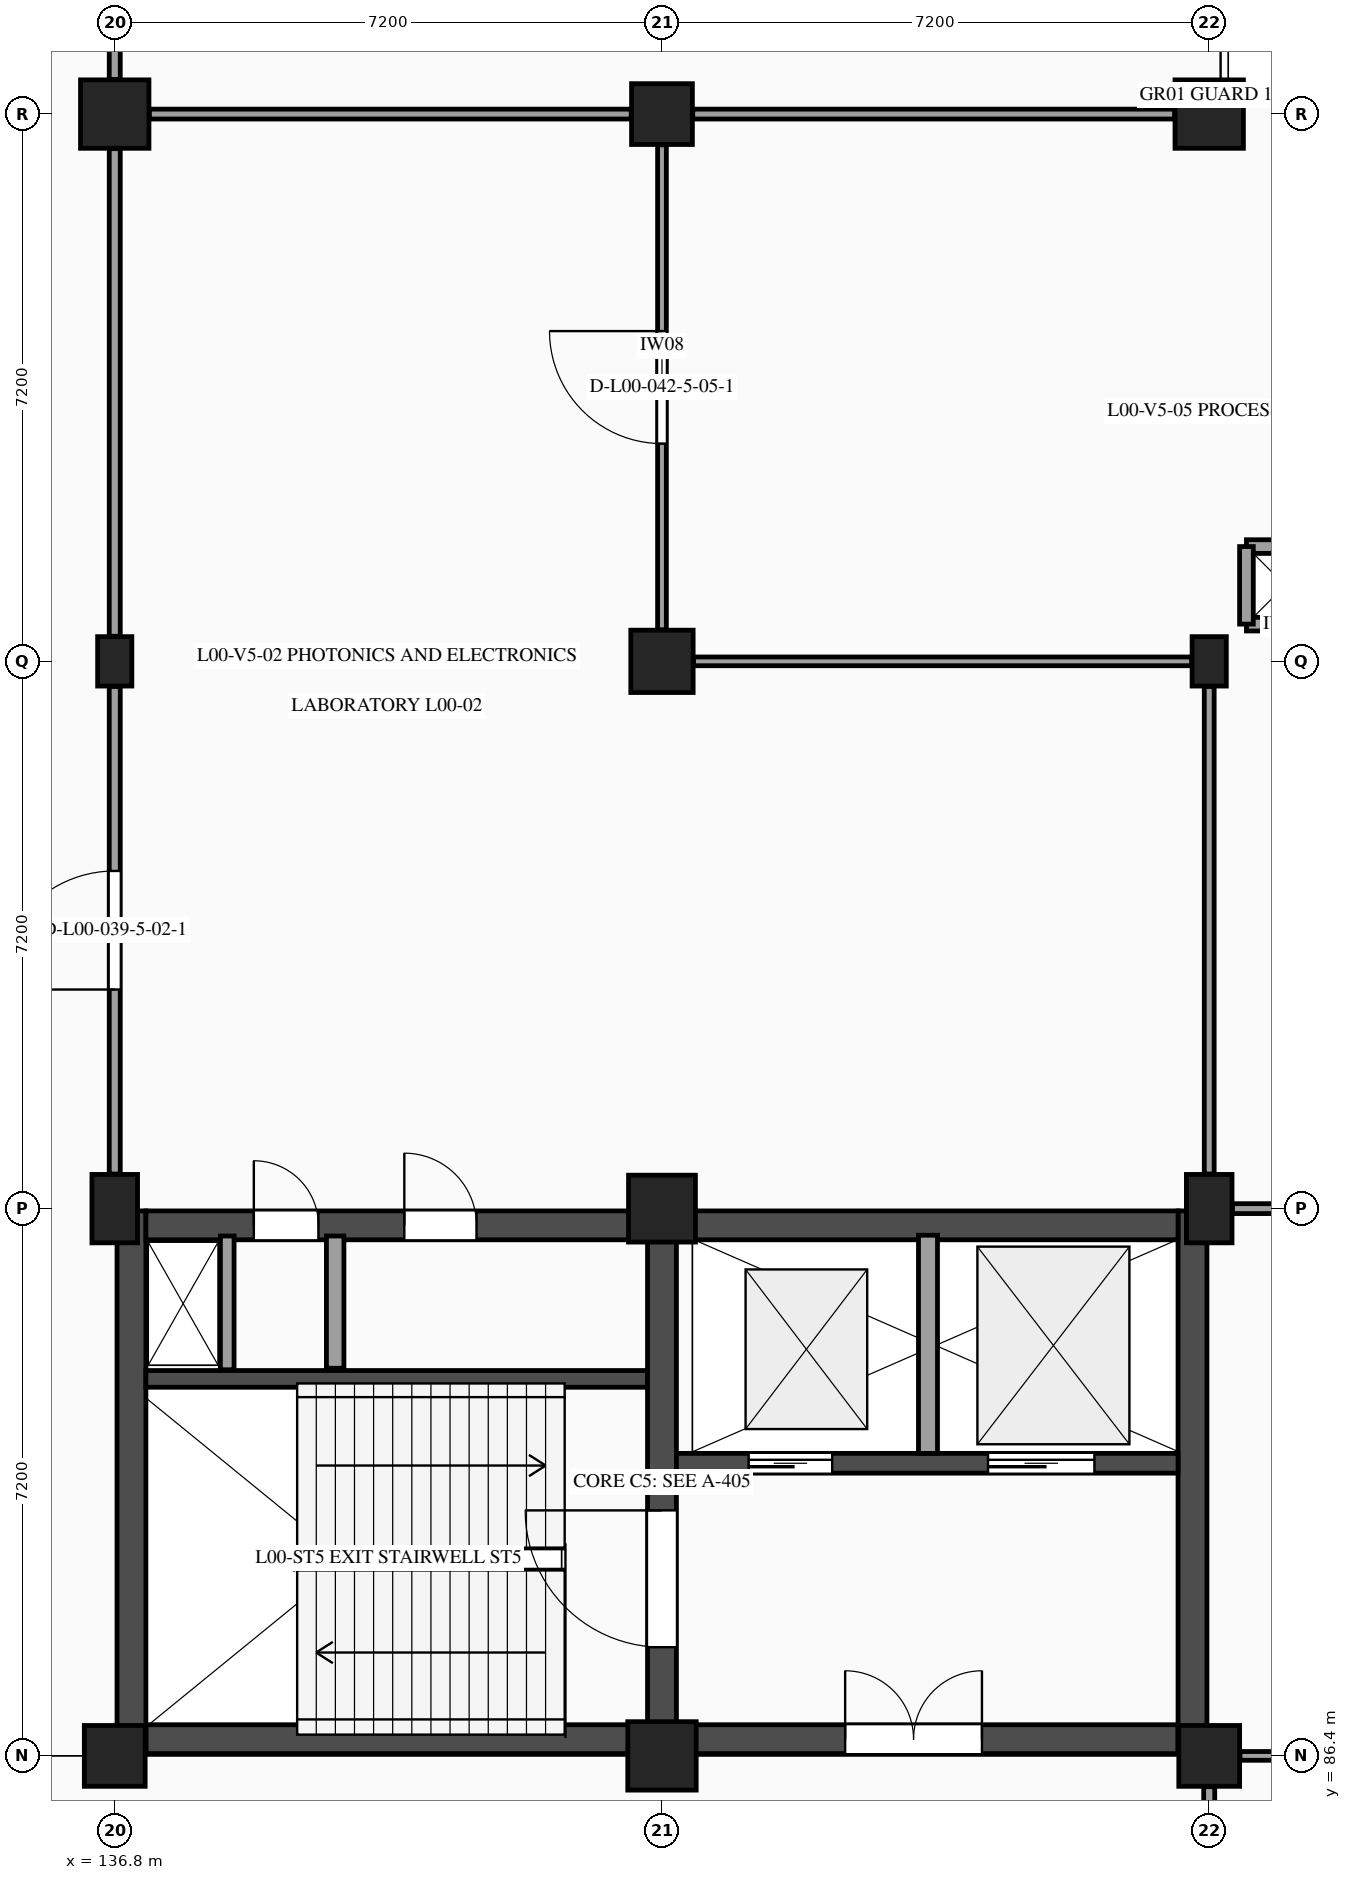
"""IFC4 building model, lengths in metres.
Left out: names, types, materials, properties, quantities, classifications, styles, units other than length and angle.
Written with IfcOpenShell. Run it as: python <this file> out.ifc"""

import sys

from ifc_helpers import new_model, si_unit, direction, frame, frame_2d, origin, origin_2d, place, context, subcontext, project, spatial, rectangle, extrude, element, fill, save


model = new_model("IFC4")
c1 = context("Model", 3, precision=1e-05, world=origin(), true_north=direction((0.0, 1.0)))
c2 = subcontext(c1, "Body", "Model", "MODEL_VIEW")
j1 = project(units=[si_unit("LENGTHUNIT", "METRE"), si_unit("PLANEANGLEUNIT", "RADIAN")], contexts=[c1])
p1 = place(None, origin())
s1 = spatial("IfcSite", under=j1, at=p1, CompositionType="ELEMENT")
p2 = place(p1, origin())
s2 = spatial("IfcBuilding", under=s1, at=p2, CompositionType="ELEMENT")
p3 = place(p2, origin())
s3 = spatial("IfcBuildingStorey", under=s2, at=p3, CompositionType="ELEMENT", Elevation=0.0)
p4 = place(p3, frame((136.8, 86.4, 0.0), z_axis=(0.0, 0.0, 1.0), x_axis=(1.0, 0.0, 0.0)))
e1 = element("IfcColumn", 1, at=p4, inside=s3, PredefinedType="COLUMN", context=c2, shape_type="SweptSolid", body=[
    extrude(rectangle(XDim=0.8, YDim=0.8, at=origin_2d()), origin(), (0.0, 0.0, 1.0), 5.4),
])
p5 = place(p3, frame((136.8, 93.6, 0.0), z_axis=(0.0, 0.0, 1.0), x_axis=(1.0, 0.0, 0.0)))
e2 = element("IfcColumn", 2, at=p5, inside=s3, PredefinedType="COLUMN", context=c2, shape_type="SweptSolid", body=[
    extrude(rectangle(XDim=0.6, YDim=0.9, at=origin_2d()), origin(), (0.0, 0.0, 1.0), 5.4),
])
p6 = place(p3, frame((136.8, 100.8, 0.0), z_axis=(0.0, 0.0, 1.0), x_axis=(1.0, 0.0, 0.0)))
e3 = element("IfcColumn", 3, at=p6, inside=s3, PredefinedType="PILASTER", context=c2, shape_type="SweptSolid", body=[
    extrude(rectangle(XDim=0.45, YDim=0.65, at=origin_2d()), origin(), (0.0, 0.0, 1.0), 5.4),
])
for number, where, z_axis, x_axis in (
    (4, (136.8, 108.0, 0.0), (0.0, 0.0, 1.0), (1.0, 0.0, 0.0)),
    (5, (144.0, 86.4, 0.0), (0.0, 0.0, 1.0), (1.0, 0.0, 0.0)),
):
    element("IfcColumn", number, at=place(p3, frame(where, z_axis=z_axis, x_axis=x_axis)), inside=s3, PredefinedType="COLUMN", context=c2, shape_type="SweptSolid", body=[
        extrude(rectangle(XDim=0.9, YDim=0.9, at=origin_2d()), origin(), (0.0, 0.0, 1.0), 5.4),
    ])
p7 = place(p3, frame((144.0, 93.6, 0.0), z_axis=(0.0, 0.0, 1.0), x_axis=(1.0, 0.0, 0.0)))
e6 = element("IfcColumn", 6, at=p7, inside=s3, PredefinedType="COLUMN", context=c2, shape_type="SweptSolid", body=[
    extrude(rectangle(XDim=0.88, YDim=0.88, at=origin_2d()), origin(), (0.0, 0.0, 1.0), 5.4),
])
p8 = place(p3, frame((144.0, 100.8, 0.0), z_axis=(0.0, 0.0, 1.0), x_axis=(1.0, 0.0, 0.0)))
e7 = element("IfcColumn", 7, at=p8, inside=s3, PredefinedType="COLUMN", context=c2, shape_type="SweptSolid", body=[
    extrude(rectangle(XDim=0.82, YDim=0.82, at=origin_2d()), origin(), (0.0, 0.0, 1.0), 5.4),
])
for number, where, z_axis, x_axis in (
    (8, (144.0, 108.0, 0.0), (0.0, 0.0, 1.0), (1.0, 0.0, 0.0)),
    (9, (151.2, 86.4, 0.0), (0.0, 0.0, 1.0), (1.0, 0.0, 0.0)),
):
    element("IfcColumn", number, at=place(p3, frame(where, z_axis=z_axis, x_axis=x_axis)), inside=s3, PredefinedType="COLUMN", context=c2, shape_type="SweptSolid", body=[
        extrude(rectangle(XDim=0.8, YDim=0.8, at=origin_2d()), origin(), (0.0, 0.0, 1.0), 5.4),
    ])
p9 = place(p3, frame((151.2, 93.6, 0.0), z_axis=(0.0, 0.0, 1.0), x_axis=(1.0, 0.0, 0.0)))
e10 = element("IfcColumn", 10, at=p9, inside=s3, PredefinedType="COLUMN", context=c2, shape_type="SweptSolid", body=[
    extrude(rectangle(XDim=0.6, YDim=0.9, at=origin_2d()), origin(), (0.0, 0.0, 1.0), 5.4),
])
p10 = place(p3, frame((151.2, 100.8, 0.0), z_axis=(0.0, 0.0, 1.0), x_axis=(1.0, 0.0, 0.0)))
e11 = element("IfcColumn", 11, at=p10, inside=s3, PredefinedType="PILASTER", context=c2, shape_type="SweptSolid", body=[
    extrude(rectangle(XDim=0.45, YDim=0.65, at=origin_2d()), origin(), (0.0, 0.0, 1.0), 5.4),
])
p11 = place(p3, frame((151.2, 108.0, 0.0), z_axis=(0.0, 0.0, 1.0), x_axis=(1.0, 0.0, 0.0)))
e12 = element("IfcColumn", 12, at=p11, inside=s3, PredefinedType="COLUMN", context=c2, shape_type="SweptSolid", body=[
    extrude(rectangle(XDim=0.9, YDim=0.9, at=origin_2d()), origin(), (0.0, 0.0, 1.0), 5.4),
])
p12 = place(p3, frame((137.21, 86.62, 0.0), z_axis=(0.0, 0.0, 1.0), x_axis=(1.0, 0.0, 0.0)))
e13 = element("IfcWall", 13, at=p12, inside=s3, PredefinedType="SHEAR", context=c2, shape_type="SweptSolid", body=[
    extrude(rectangle(XDim=6.6, YDim=0.38, at=frame_2d((3.3, 0.0))), origin(), (0.0, 0.0, 1.0), 5.09),
])
p13 = place(p3, frame((137.02, 93.57, 0.0), z_axis=(0.0, 0.0, 1.0), x_axis=(0.0, -1.0, 0.0)))
e14 = element("IfcWall", 14, at=p13, inside=s3, PredefinedType="SHEAR", context=c2, shape_type="SweptSolid", body=[
    extrude(rectangle(XDim=7.14, YDim=0.38, at=frame_2d((3.57, 0.0))), origin(), (0.0, 0.0, 1.0), 5.09),
])
p14 = place(p3, frame((137.21, 93.38, 0.0), z_axis=(0.0, 0.0, 1.0), x_axis=(1.0, 0.0, 0.0)))
e15 = element("IfcWall", 15, at=p14, inside=s3, PredefinedType="SHEAR", context=c2, shape_type="SweptSolid", body=[
    extrude(rectangle(XDim=6.6, YDim=0.38, at=frame_2d((3.3, 0.0))), origin(), (0.0, 0.0, 1.0), 5.09),
])
p15 = place(p14, frame((1.42, 0.0, 0.0)))
e16 = element("IfcOpeningElement", 16, at=p15, cuts=e15, PredefinedType="OPENING", context=c2, shape_type="SweptSolid", body=[
    extrude(rectangle(XDim=0.85, YDim=2.1, at=frame_2d((0.425, 1.05))), frame((0.0, 0.2, 0.0), z_axis=(0.0, -1.0, 0.0), x_axis=(1.0, 0.0, 0.0)), (0.0, 0.0, 1.0), 0.4),
])
p16 = place(p14, frame((3.4, 0.0, 0.0)))
e17 = element("IfcOpeningElement", 17, at=p16, cuts=e15, PredefinedType="OPENING", context=c2, shape_type="SweptSolid", body=[
    extrude(rectangle(XDim=0.95, YDim=2.15, at=frame_2d((0.475, 1.075))), frame((0.0, 0.2, 0.0), z_axis=(0.0, -1.0, 0.0), x_axis=(1.0, 0.0, 0.0)), (0.0, 0.0, 1.0), 0.4),
])
p17 = place(p3, frame((137.21, 91.36, 0.0), z_axis=(0.0, 0.0, 1.0), x_axis=(1.0, 0.0, 0.0)))
e18 = element("IfcWall", 18, at=p17, inside=s3, PredefinedType="SHEAR", context=c2, shape_type="SweptSolid", body=[
    extrude(rectangle(XDim=6.6, YDim=0.22, at=frame_2d((3.3, 0.0))), origin(), (0.0, 0.0, 1.0), 5.09),
])
p18 = place(p3, frame((139.7, 91.5, 0.0), z_axis=(0.0, 0.0, 1.0), x_axis=(0.0, 1.0, 0.0)))
e19 = element("IfcWall", 19, at=p18, inside=s3, PredefinedType="PARTITIONING", context=c2, shape_type="SweptSolid", body=[
    extrude(rectangle(XDim=1.74, YDim=0.23, at=frame_2d((0.87, 0.0))), origin(), (0.0, 0.0, 1.0), 5.09),
])
p19 = place(p3, frame((138.28, 91.48, 0.0), z_axis=(0.0, 0.0, 1.0), x_axis=(0.0, 1.0, 0.0)))
e20 = element("IfcWall", 20, at=p19, inside=s3, PredefinedType="PARTITIONING", context=c2, shape_type="SweptSolid", body=[
    extrude(rectangle(XDim=1.76, YDim=0.18, at=frame_2d((0.88, 0.0))), origin(), (0.0, 0.0, 1.0), 5.09),
])
p20 = place(p3, frame((144.0, 86.43, 0.0), z_axis=(0.0, 0.0, 1.0), x_axis=(0.0, 1.0, 0.0)))
e21 = element("IfcWall", 21, at=p20, inside=s3, PredefinedType="SHEAR", context=c2, shape_type="SweptSolid", body=[
    extrude(rectangle(XDim=7.14, YDim=0.38, at=frame_2d((3.57, 0.0))), origin(), (0.0, 0.0, 1.0), 5.09),
])
p21 = place(p20, frame((1.4, 0.0, 0.0)))
e22 = element("IfcOpeningElement", 22, at=p21, cuts=e21, PredefinedType="OPENING", context=c2, shape_type="SweptSolid", body=[
    extrude(rectangle(XDim=1.8, YDim=2.2, at=frame_2d((0.9, 1.1))), frame((0.0, 0.2, 0.0), z_axis=(0.0, -1.0, 0.0), x_axis=(1.0, 0.0, 0.0)), (0.0, 0.0, 1.0), 0.4),
])
p22 = place(p3, frame((144.19, 86.62, 0.0), z_axis=(0.0, 0.0, 1.0), x_axis=(1.0, 0.0, 0.0)))
e23 = element("IfcWall", 23, at=p22, inside=s3, PredefinedType="SHEAR", context=c2, shape_type="SweptSolid", body=[
    extrude(rectangle(XDim=6.6, YDim=0.38, at=frame_2d((3.3, 0.0))), origin(), (0.0, 0.0, 1.0), 5.09),
])
p23 = place(p22, frame((2.22, 0.0, 0.0)))
e24 = element("IfcOpeningElement", 24, at=p23, cuts=e23, PredefinedType="OPENING", context=c2, shape_type="SweptSolid", body=[
    extrude(rectangle(XDim=1.8, YDim=2.2, at=frame_2d((0.9, 1.1))), frame((0.0, 0.2, 0.0), z_axis=(0.0, -1.0, 0.0), x_axis=(1.0, 0.0, 0.0)), (0.0, 0.0, 1.0), 0.4),
])
p24 = place(p3, frame((150.98, 86.43, 0.0), z_axis=(0.0, 0.0, 1.0), x_axis=(0.0, 1.0, 0.0)))
e25 = element("IfcWall", 25, at=p24, inside=s3, PredefinedType="SHEAR", context=c2, shape_type="SweptSolid", body=[
    extrude(rectangle(XDim=7.14, YDim=0.38, at=frame_2d((3.57, 0.0))), origin(), (0.0, 0.0, 1.0), 5.09),
])
p25 = place(p3, frame((144.19, 93.38, 0.0), z_axis=(0.0, 0.0, 1.0), x_axis=(1.0, 0.0, 0.0)))
e26 = element("IfcWall", 26, at=p25, inside=s3, PredefinedType="SHEAR", context=c2, shape_type="SweptSolid", body=[
    extrude(rectangle(XDim=6.6, YDim=0.38, at=frame_2d((3.3, 0.0))), origin(), (0.0, 0.0, 1.0), 5.09),
])
p26 = place(p3, frame((144.19, 90.25, 0.0), z_axis=(0.0, 0.0, 1.0), x_axis=(1.0, 0.0, 0.0)))
e27 = element("IfcWall", 27, at=p26, inside=s3, PredefinedType="SHEAR", context=c2, shape_type="SweptSolid", body=[
    extrude(rectangle(XDim=6.6, YDim=0.26, at=frame_2d((3.3, 0.0))), origin(), (0.0, 0.0, 1.0), 5.09),
])
p27 = place(p26, frame((0.95, 0.0, 0.0)))
e28 = element("IfcOpeningElement", 28, at=p27, cuts=e27, PredefinedType="OPENING", context=c2, shape_type="SweptSolid", body=[
    extrude(rectangle(XDim=1.1, YDim=2.2, at=frame_2d((0.55, 1.1))), frame((0.0, 0.14, 0.0), z_axis=(0.0, -1.0, 0.0), x_axis=(1.0, 0.0, 0.0)), (0.0, 0.0, 1.0), 0.28),
])
p28 = place(p26, frame((4.1, 0.0, 0.0)))
e29 = element("IfcOpeningElement", 29, at=p28, cuts=e27, PredefinedType="OPENING", context=c2, shape_type="SweptSolid", body=[
    extrude(rectangle(XDim=1.4, YDim=2.3, at=frame_2d((0.7, 1.15))), frame((0.0, 0.14, 0.0), z_axis=(0.0, -1.0, 0.0), x_axis=(1.0, 0.0, 0.0)), (0.0, 0.0, 1.0), 0.28),
])
p29 = place(p3, frame((147.5, 90.38, 0.0), z_axis=(0.0, 0.0, 1.0), x_axis=(0.0, 1.0, 0.0)))
e30 = element("IfcWall", 30, at=p29, inside=s3, PredefinedType="PARTITIONING", context=c2, shape_type="SweptSolid", body=[
    extrude(rectangle(XDim=2.87, YDim=0.25, at=frame_2d((1.435, 0.0))), origin(), (0.0, 0.0, 1.0), 5.09),
])
for number, where, z_axis, x_axis in (
    (31, (151.69, 101.29, 0.0), (0.0, 0.0, 1.0), (1.0, 0.0, 0.0)),
    (32, (152.71, 102.31, 0.0), (0.0, 0.0, 1.0), (-1.0, 0.0, 0.0)),
    (33, (151.69, 102.31, 0.0), (0.0, 0.0, 1.0), (0.0, -1.0, 0.0)),
):
    element("IfcWall", number, at=place(p3, frame(where, z_axis=z_axis, x_axis=x_axis)), inside=s3, PredefinedType="PARTITIONING", context=c2, shape_type="SweptSolid", body=[
        extrude(rectangle(XDim=1.02, YDim=0.18, at=frame_2d((0.51, 0.0))), origin(), (0.0, 0.0, 1.0), 5.09),
    ])
p30 = place(p3, frame((136.8, 94.055, 0.0), z_axis=(0.0, 0.0, 1.0), x_axis=(0.0, 1.0, 0.0)))
e34 = element("IfcWall", 34, at=p30, inside=s3, PredefinedType="PARTITIONING", context=c2, shape_type="SweptSolid", body=[
    extrude(rectangle(XDim=6.415, YDim=0.145, at=frame_2d((3.208, 0.0))), origin(), (0.0, 0.0, 1.0), 4.46),
])
p31 = place(p30, frame((2.427, 0.0, 0.0)))
e35 = element("IfcOpeningElement", 35, at=p31, cuts=e34, PredefinedType="OPENING", context=c2, shape_type="SweptSolid", body=[
    extrude(rectangle(XDim=1.56, YDim=2.25, at=frame_2d((0.78, 1.125))), frame((0.0, 0.083, 0.0), z_axis=(0.0, -1.0, 0.0), x_axis=(1.0, 0.0, 0.0)), (0.0, 0.0, 1.0), 0.165),
])
p32 = place(p3, frame((136.8, 101.13, 0.0), z_axis=(0.0, 0.0, 1.0), x_axis=(0.0, 1.0, 0.0)))
e36 = element("IfcWall", 36, at=p32, inside=s3, PredefinedType="PARTITIONING", context=c2, shape_type="SweptSolid", body=[
    extrude(rectangle(XDim=6.415, YDim=0.145, at=frame_2d((3.208, 0.0))), origin(), (0.0, 0.0, 1.0), 4.455),
])
p33 = place(p3, frame((136.8, 108.455, 0.0), z_axis=(0.0, 0.0, 1.0), x_axis=(0.0, 1.0, 0.0)))
e37 = element("IfcWall", 37, at=p33, inside=s3, PredefinedType="PARTITIONING", context=c2, shape_type="SweptSolid", body=[
    extrude(rectangle(XDim=6.3, YDim=0.145, at=frame_2d((3.15, 0.0))), origin(), (0.0, 0.0, 1.0), 4.405),
])
p34 = place(p33, frame((2.46, 0.0, 0.0)))
e38 = element("IfcOpeningElement", 38, at=p34, cuts=e37, PredefinedType="OPENING", context=c2, shape_type="SweptSolid", body=[
    extrude(rectangle(XDim=1.38, YDim=2.22, at=frame_2d((0.69, 1.11))), frame((0.0, 0.083, 0.0), z_axis=(0.0, -1.0, 0.0), x_axis=(1.0, 0.0, 0.0)), (0.0, 0.0, 1.0), 0.165),
])
p35 = place(p3, frame((144.0, 101.215, 0.0), z_axis=(0.0, 0.0, 1.0), x_axis=(0.0, 1.0, 0.0)))
e39 = element("IfcWall", 39, at=p35, inside=s3, PredefinedType="PARTITIONING", context=c2, shape_type="SweptSolid", body=[
    extrude(rectangle(XDim=6.38, YDim=0.115, at=frame_2d((3.19, 0.0))), origin(), (0.0, 0.0, 1.0), 4.455),
])
p36 = place(p35, frame((2.45, 0.0, 0.0)))
e40 = element("IfcOpeningElement", 40, at=p36, cuts=e39, PredefinedType="OPENING", context=c2, shape_type="SweptSolid", body=[
    extrude(rectangle(XDim=1.48, YDim=2.28, at=frame_2d((0.74, 1.14))), frame((0.0, 0.067, 0.0), z_axis=(0.0, -1.0, 0.0), x_axis=(1.0, 0.0, 0.0)), (0.0, 0.0, 1.0), 0.135),
])
p37 = place(p3, frame((137.255, 108.0, 0.0), z_axis=(0.0, 0.0, 1.0), x_axis=(1.0, 0.0, 0.0)))
e41 = element("IfcWall", 41, at=p37, inside=s3, PredefinedType="PARTITIONING", context=c2, shape_type="SweptSolid", body=[
    extrude(rectangle(XDim=6.34, YDim=0.13, at=frame_2d((3.17, 0.0))), origin(), (0.0, 0.0, 1.0), 4.29),
])
p38 = place(p3, frame((151.2, 79.615, 0.0), z_axis=(0.0, 0.0, 1.0), x_axis=(0.0, 1.0, 0.0)))
e42 = element("IfcWall", 42, at=p38, inside=s3, PredefinedType="PARTITIONING", context=c2, shape_type="SweptSolid", body=[
    extrude(rectangle(XDim=6.38, YDim=0.145, at=frame_2d((3.19, 0.0))), origin(), (0.0, 0.0, 1.0), 4.395),
])
p39 = place(p3, frame((151.2, 94.055, 0.0), z_axis=(0.0, 0.0, 1.0), x_axis=(0.0, 1.0, 0.0)))
e43 = element("IfcWall", 43, at=p39, inside=s3, PredefinedType="PARTITIONING", context=c2, shape_type="SweptSolid", body=[
    extrude(rectangle(XDim=6.415, YDim=0.13, at=frame_2d((3.208, 0.0))), origin(), (0.0, 0.0, 1.0), 4.46),
])
p40 = place(p3, frame((144.415, 100.8, 0.0), z_axis=(0.0, 0.0, 1.0), x_axis=(1.0, 0.0, 0.0)))
e44 = element("IfcWall", 44, at=p40, inside=s3, PredefinedType="PARTITIONING", context=c2, shape_type="SweptSolid", body=[
    extrude(rectangle(XDim=6.555, YDim=0.115, at=frame_2d((3.277, 0.0))), origin(), (0.0, 0.0, 1.0), 4.31),
])
p41 = place(p3, frame((144.405, 108.0, 0.0), z_axis=(0.0, 0.0, 1.0), x_axis=(1.0, 0.0, 0.0)))
e45 = element("IfcWall", 45, at=p41, inside=s3, PredefinedType="PARTITIONING", context=c2, shape_type="SweptSolid", body=[
    extrude(rectangle(XDim=6.34, YDim=0.13, at=frame_2d((3.17, 0.0))), origin(), (0.0, 0.0, 1.0), 4.31),
])
p42 = place(p3, frame((151.605, 86.4, 0.0), z_axis=(0.0, 0.0, 1.0), x_axis=(1.0, 0.0, 0.0)))
e46 = element("IfcWall", 46, at=p42, inside=s3, PredefinedType="PARTITIONING", context=c2, shape_type="SweptSolid", body=[
    extrude(rectangle(XDim=6.34, YDim=0.115, at=frame_2d((3.17, 0.0))), origin(), (0.0, 0.0, 1.0), 4.34),
])
p43 = place(p42, frame((2.695, 0.0, 0.0)))
e47 = element("IfcOpeningElement", 47, at=p43, cuts=e46, PredefinedType="OPENING", context=c2, shape_type="SweptSolid", body=[
    extrude(rectangle(XDim=0.95, YDim=2.15, at=frame_2d((0.475, 1.075))), frame((0.0, 0.067, 0.0), z_axis=(0.0, -1.0, 0.0), x_axis=(1.0, 0.0, 0.0)), (0.0, 0.0, 1.0), 0.135),
])
p44 = place(p3, frame((151.505, 93.6, 0.0), z_axis=(0.0, 0.0, 1.0), x_axis=(1.0, 0.0, 0.0)))
e48 = element("IfcWall", 48, at=p44, inside=s3, PredefinedType="PARTITIONING", context=c2, shape_type="SweptSolid", body=[
    extrude(rectangle(XDim=6.45, YDim=0.13, at=frame_2d((3.225, 0.0))), origin(), (0.0, 0.0, 1.0), 4.34),
])
p45 = place(p15, origin())
e49 = element("IfcDoor", 49, at=p45, inside=s3, OperationType="SINGLE_SWING_LEFT", PredefinedType="DOOR", context=c2, shape_type="SweptSolid", body=[
    extrude(rectangle(XDim=0.85, YDim=2.1, at=frame_2d((0.425, 1.05))), frame((0.0, 0.025, 0.0), z_axis=(0.0, -1.0, 0.0), x_axis=(1.0, 0.0, 0.0)), (0.0, 0.0, 1.0), 0.05),
])
fill(e16, e49)
p46 = place(p21, frame((1.8, 0.0, 0.0), z_axis=(0.0, 0.0, 1.0), x_axis=(-1.0, 0.0, 0.0)))
e50 = element("IfcDoor", 50, at=p46, inside=s3, OperationType="SINGLE_SWING_RIGHT", PredefinedType="DOOR", context=c2, shape_type="SweptSolid", body=[
    extrude(rectangle(XDim=1.8, YDim=2.2, at=frame_2d((0.9, 1.1))), frame((0.0, 0.025, 0.0), z_axis=(0.0, -1.0, 0.0), x_axis=(1.0, 0.0, 0.0)), (0.0, 0.0, 1.0), 0.05),
])
fill(e22, e50)
p47 = place(p16, origin())
e51 = element("IfcDoor", 51, at=p47, inside=s3, OperationType="SINGLE_SWING_LEFT", PredefinedType="DOOR", context=c2, shape_type="SweptSolid", body=[
    extrude(rectangle(XDim=0.95, YDim=2.15, at=frame_2d((0.475, 1.075))), frame((0.0, 0.025, 0.0), z_axis=(0.0, -1.0, 0.0), x_axis=(1.0, 0.0, 0.0)), (0.0, 0.0, 1.0), 0.05),
])
fill(e17, e51)
p48 = place(p27, origin())
e52 = element("IfcDoor", 52, at=p48, inside=s3, OperationType="SLIDING_TO_LEFT", PredefinedType="DOOR", context=c2, shape_type="SweptSolid", body=[
    extrude(rectangle(XDim=1.1, YDim=2.2, at=frame_2d((0.55, 1.1))), frame((0.0, 0.025, 0.0), z_axis=(0.0, -1.0, 0.0), x_axis=(1.0, 0.0, 0.0)), (0.0, 0.0, 1.0), 0.05),
])
fill(e28, e52)
p49 = place(p28, origin())
e53 = element("IfcDoor", 53, at=p49, inside=s3, OperationType="SLIDING_TO_RIGHT", PredefinedType="DOOR", context=c2, shape_type="SweptSolid", body=[
    extrude(rectangle(XDim=1.4, YDim=2.3, at=frame_2d((0.7, 1.15))), frame((0.0, 0.025, 0.0), z_axis=(0.0, -1.0, 0.0), x_axis=(1.0, 0.0, 0.0)), (0.0, 0.0, 1.0), 0.05),
])
fill(e29, e53)
p50 = place(p23, frame((1.8, 0.0, 0.0), z_axis=(0.0, 0.0, 1.0), x_axis=(-1.0, 0.0, 0.0)))
e54 = element("IfcDoor", 54, at=p50, inside=s3, OperationType="DOUBLE_DOOR_SINGLE_SWING", PredefinedType="DOOR", context=c2, shape_type="SweptSolid", body=[
    extrude(rectangle(XDim=1.8, YDim=2.2, at=frame_2d((0.9, 1.1))), frame((0.0, 0.025, 0.0), z_axis=(0.0, -1.0, 0.0), x_axis=(1.0, 0.0, 0.0)), (0.0, 0.0, 1.0), 0.05),
])
fill(e24, e54)
p51 = place(p31, origin())
e55 = element("IfcDoor", 55, at=p51, inside=s3, OperationType="SINGLE_SWING_LEFT", PredefinedType="DOOR", context=c2, shape_type="SweptSolid", body=[
    extrude(rectangle(XDim=1.56, YDim=2.25, at=frame_2d((0.78, 1.125))), frame((0.0, 0.025, 0.0), z_axis=(0.0, -1.0, 0.0), x_axis=(1.0, 0.0, 0.0)), (0.0, 0.0, 1.0), 0.05),
])
fill(e35, e55)
p52 = place(p36, origin())
e56 = element("IfcDoor", 56, at=p52, inside=s3, OperationType="SINGLE_SWING_RIGHT", PredefinedType="DOOR", context=c2, shape_type="SweptSolid", body=[
    extrude(rectangle(XDim=1.48, YDim=2.28, at=frame_2d((0.74, 1.14))), frame((0.0, 0.025, 0.0), z_axis=(0.0, -1.0, 0.0), x_axis=(1.0, 0.0, 0.0)), (0.0, 0.0, 1.0), 0.05),
])
fill(e40, e56)
save(model, sys.argv[1])
